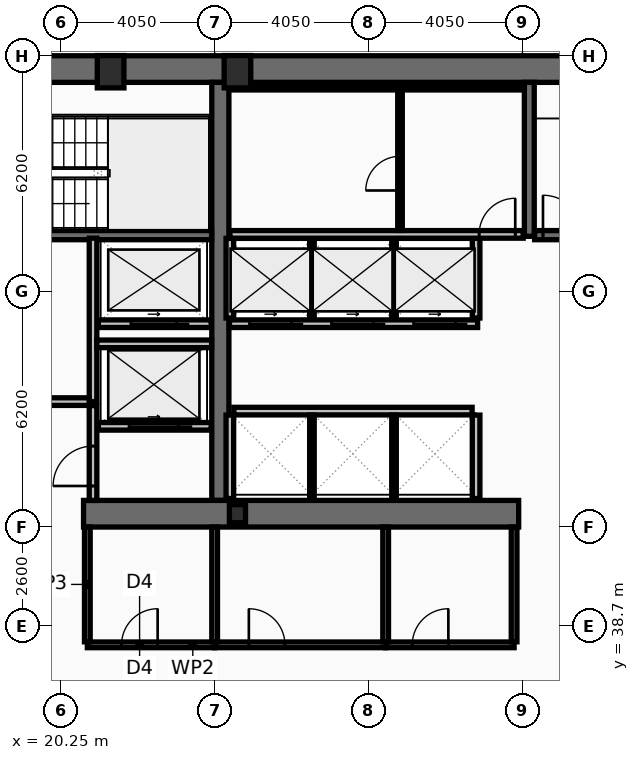
"""IFC4 building model, lengths in metres.
Left out: names, types, materials, properties, quantities, classifications, styles, units other than length and angle.
Written with IfcOpenShell. Run it as: python <this file> out.ifc"""

import sys

from ifc_helpers import new_model, si_unit, direction, frame, frame_2d, origin, origin_2d, place, context, subcontext, project, spatial, rectangle, hollow_rectangle, i_section, extrude, element, fill, save


model = new_model("IFC4")
c1 = context("Model", 3, precision=1e-05, world=origin(), true_north=direction((0.0, 1.0)))
c2 = subcontext(c1, "Body", "Model", "MODEL_VIEW")
j1 = project(units=[si_unit("LENGTHUNIT", "METRE"), si_unit("PLANEANGLEUNIT", "RADIAN")], contexts=[c1])
p1 = place(None, origin())
s1 = spatial("IfcSite", under=j1, at=p1, CompositionType="ELEMENT")
p2 = place(p1, origin())
s2 = spatial("IfcBuilding", under=s1, at=p2, CompositionType="ELEMENT")
p3 = place(p2, frame((0.0, 0.0, 98.6)))
s3 = spatial("IfcBuildingStorey", under=s2, at=p3, CompositionType="ELEMENT", Elevation=98.6)
p4 = place(p3, frame((16.2, 53.35, 0.0), z_axis=(0.0, 0.0, 1.0), x_axis=(1.0, 0.0, 0.0)))
e1 = element("IfcWall", 1, at=p4, inside=s3, PredefinedType="SHEAR", context=c2, shape_type="SweptSolid", body=[
    extrude(rectangle(XDim=40.5, YDim=0.7, at=frame_2d((20.25, 0.0))), origin(), (0.0, 0.0, 1.0), 3.82),
])
p5 = place(p3, frame((24.45, 42.0, 0.0), z_axis=(0.0, 0.0, 1.0), x_axis=(0.0, 1.0, 0.0)))
e2 = element("IfcWall", 2, at=p5, inside=s3, PredefinedType="SHEAR", context=c2, shape_type="SweptSolid", body=[
    extrude(rectangle(XDim=11.0, YDim=0.45, at=frame_2d((5.5, 0.0))), origin(), (0.0, 0.0, 1.0), 3.82),
])
p6 = place(p3, frame((32.3, 41.65, 0.0), z_axis=(0.0, 0.0, 1.0), x_axis=(-1.0, 0.0, 0.0)))
e3 = element("IfcWall", 3, at=p6, inside=s3, PredefinedType="SHEAR", context=c2, shape_type="SweptSolid", body=[
    extrude(rectangle(XDim=11.45, YDim=0.7, at=frame_2d((5.725, 0.0))), origin(), (0.0, 0.0, 1.0), 3.82),
])
p7 = place(p3, frame((32.58, 48.95, 0.0), z_axis=(0.0, 0.0, 1.0), x_axis=(0.0, 1.0, 0.0)))
e4 = element("IfcWall", 4, at=p7, inside=s3, PredefinedType="SHEAR", context=c2, shape_type="SweptSolid", body=[
    extrude(rectangle(XDim=4.05, YDim=0.26, at=frame_2d((2.025, 0.0))), origin(), (0.0, 0.0, 1.0), 3.82),
])
p8 = place(p3, frame((16.9, 48.98, 0.0), z_axis=(0.0, 0.0, 1.0), x_axis=(1.0, 0.0, 0.0)))
e5 = element("IfcWall", 5, at=p8, inside=s3, PredefinedType="SHEAR", context=c2, shape_type="SweptSolid", body=[
    extrude(rectangle(XDim=7.32, YDim=0.24, at=frame_2d((3.66, 0.0))), origin(), (0.0, 0.0, 1.0), 3.82),
])
p9 = place(p8, frame((0.22, 0.0, 0.0)))
e6 = element("IfcOpeningElement", 6, at=p9, cuts=e5, PredefinedType="OPENING", context=c2, shape_type="SweptSolid", body=[
    extrude(rectangle(XDim=1.05, YDim=2.15, at=frame_2d((0.525, 1.075))), frame((0.0, 0.13, 0.0), z_axis=(0.0, -1.0, 0.0), x_axis=(1.0, 0.0, 0.0)), (0.0, 0.0, 1.0), 0.26),
])
p10 = place(p3, frame((32.72, 48.98, 0.0), z_axis=(0.0, 0.0, 1.0), x_axis=(1.0, 0.0, 0.0)))
e7 = element("IfcWall", 7, at=p10, inside=s3, PredefinedType="SHEAR", context=c2, shape_type="SweptSolid", body=[
    extrude(rectangle(XDim=7.56, YDim=0.24, at=frame_2d((3.78, 0.0))), origin(), (0.0, 0.0, 1.0), 3.82),
])
p11 = place(p10, frame((0.22, 0.0, 0.0)))
e8 = element("IfcOpeningElement", 8, at=p11, cuts=e7, PredefinedType="OPENING", context=c2, shape_type="SweptSolid", body=[
    extrude(rectangle(XDim=1.05, YDim=2.15, at=frame_2d((0.525, 1.075))), frame((0.0, 0.13, 0.0), z_axis=(0.0, -1.0, 0.0), x_axis=(1.0, 0.0, 0.0)), (0.0, 0.0, 1.0), 0.26),
])
for number, where, z_axis, x_axis in (
    (9, (21.562, 53.28, 0.0), (0.0, 0.0, 1.0), (1.0, 0.0, 0.0)),
    (10, (24.9, 53.28, 0.0), (0.0, 0.0, 1.0), (1.0, 0.0, 0.0)),
):
    element("IfcColumn", number, at=place(p3, frame(where, z_axis=z_axis, x_axis=x_axis)), inside=s3, PredefinedType="COLUMN", context=c2, shape_type="SweptSolid", body=[
        extrude(hollow_rectangle(XDim=0.7, YDim=0.85, WallThickness=0.05, at=origin_2d()), origin(), (0.0, 0.0, 1.0), 4.0),
    ])
p12 = place(p3, frame((24.9, 41.65, 0.0), z_axis=(0.0, 0.0, 1.0), x_axis=(1.0, 0.0, 0.0)))
e11 = element("IfcColumn", 11, at=p12, inside=s3, PredefinedType="COLUMN", context=c2, shape_type="SweptSolid", body=[
    extrude(i_section(OverallWidth=0.424, OverallDepth=0.474, WebThickness=0.048, FlangeThickness=0.077, at=origin_2d()), origin(), (0.0, 0.0, 1.0), 4.0),
])
p13 = place(p3, frame((24.21, 43.95, 0.0), z_axis=(0.0, 0.0, 1.0), x_axis=(-1.0, 0.0, 0.0)))
e12 = element("IfcWall", 12, at=p13, inside=s3, PredefinedType="PARTITIONING", context=c2, shape_type="SweptSolid", body=[
    extrude(rectangle(XDim=2.97, YDim=0.2, at=frame_2d((1.485, 0.0))), origin(), (0.0, 0.0, 1.0), 3.82),
])
p14 = place(p13, frame((0.86, 0.0, 0.0)))
e13 = element("IfcOpeningElement", 13, at=p14, cuts=e12, PredefinedType="OPENING", context=c2, shape_type="SweptSolid", body=[
    extrude(rectangle(XDim=1.3, YDim=2.18, at=frame_2d((0.65, 1.09))), frame((0.0, 0.11, 0.0), z_axis=(0.0, -1.0, 0.0), x_axis=(1.0, 0.0, 0.0)), (0.0, 0.0, 1.0), 0.22),
])
p15 = place(p3, frame((24.21, 46.65, 0.0), z_axis=(0.0, 0.0, 1.0), x_axis=(-1.0, 0.0, 0.0)))
e14 = element("IfcWall", 14, at=p15, inside=s3, PredefinedType="PARTITIONING", context=c2, shape_type="SweptSolid", body=[
    extrude(rectangle(XDim=2.97, YDim=0.2, at=frame_2d((1.485, 0.0))), origin(), (0.0, 0.0, 1.0), 3.82),
])
p16 = place(p15, frame((0.91, 0.0, 0.0)))
e15 = element("IfcOpeningElement", 15, at=p16, cuts=e14, PredefinedType="OPENING", context=c2, shape_type="SweptSolid", body=[
    extrude(rectangle(XDim=1.2, YDim=2.18, at=frame_2d((0.6, 1.09))), frame((0.0, 0.11, 0.0), z_axis=(0.0, -1.0, 0.0), x_axis=(1.0, 0.0, 0.0)), (0.0, 0.0, 1.0), 0.22),
])
p17 = place(p3, frame((31.22, 46.65, 0.0), z_axis=(0.0, 0.0, 1.0), x_axis=(-1.0, 0.0, 0.0)))
e16 = element("IfcWall", 16, at=p17, inside=s3, PredefinedType="PARTITIONING", context=c2, shape_type="SweptSolid", body=[
    extrude(rectangle(XDim=6.53, YDim=0.2, at=frame_2d((3.265, 0.0))), origin(), (0.0, 0.0, 1.0), 3.82),
])
p18 = place(p17, frame((4.9, 0.0, 0.0)))
e17 = element("IfcOpeningElement", 17, at=p18, cuts=e16, PredefinedType="OPENING", context=c2, shape_type="SweptSolid", body=[
    extrude(rectangle(XDim=1.1, YDim=2.18, at=frame_2d((0.55, 1.09))), frame((0.0, 0.11, 0.0), z_axis=(0.0, -1.0, 0.0), x_axis=(1.0, 0.0, 0.0)), (0.0, 0.0, 1.0), 0.22),
])
p19 = place(p17, frame((2.74, 0.0, 0.0)))
e18 = element("IfcOpeningElement", 18, at=p19, cuts=e16, PredefinedType="OPENING", context=c2, shape_type="SweptSolid", body=[
    extrude(rectangle(XDim=1.1, YDim=2.18, at=frame_2d((0.55, 1.09))), frame((0.0, 0.11, 0.0), z_axis=(0.0, -1.0, 0.0), x_axis=(1.0, 0.0, 0.0)), (0.0, 0.0, 1.0), 0.22),
])
p20 = place(p17, frame((0.58, 0.0, 0.0)))
e19 = element("IfcOpeningElement", 19, at=p20, cuts=e16, PredefinedType="OPENING", context=c2, shape_type="SweptSolid", body=[
    extrude(rectangle(XDim=1.1, YDim=2.18, at=frame_2d((0.55, 1.09))), frame((0.0, 0.11, 0.0), z_axis=(0.0, -1.0, 0.0), x_axis=(1.0, 0.0, 0.0)), (0.0, 0.0, 1.0), 0.22),
])
p21 = place(p3, frame((21.1, 44.6, 0.0), z_axis=(0.0, 0.0, 1.0), x_axis=(0.0, 1.0, 0.0)))
e20 = element("IfcWall", 20, at=p21, inside=s3, PredefinedType="PARTITIONING", context=c2, shape_type="SweptSolid", body=[
    extrude(rectangle(XDim=4.3, YDim=0.2, at=frame_2d((2.15, 0.0))), origin(), (0.0, 0.0, 1.0), 3.82),
])
p22 = place(p3, frame((16.9, 44.6, 0.0), z_axis=(0.0, 0.0, 1.0), x_axis=(1.0, 0.0, 0.0)))
e21 = element("IfcWall", 21, at=p22, inside=s3, PredefinedType="PARTITIONING", context=c2, shape_type="SweptSolid", body=[
    extrude(rectangle(XDim=4.1, YDim=0.2, at=frame_2d((2.05, 0.0))), origin(), (0.0, 0.0, 1.0), 3.82),
])
p23 = place(p22, frame((1.25, 0.0, 0.0)))
e22 = element("IfcOpeningElement", 22, at=p23, cuts=e21, PredefinedType="OPENING", context=c2, shape_type="SweptSolid", body=[
    extrude(rectangle(XDim=1.05, YDim=2.15, at=frame_2d((0.525, 1.075))), frame((0.0, 0.11, 0.0), z_axis=(0.0, -1.0, 0.0), x_axis=(1.0, 0.0, 0.0)), (0.0, 0.0, 1.0), 0.22),
])
p24 = place(p3, frame((21.2, 46.12, 0.0), z_axis=(0.0, 0.0, 1.0), x_axis=(1.0, 0.0, 0.0)))
e23 = element("IfcWall", 23, at=p24, inside=s3, PredefinedType="PARTITIONING", context=c2, shape_type="SweptSolid", body=[
    extrude(rectangle(XDim=3.02, YDim=0.2, at=frame_2d((1.51, 0.0))), origin(), (0.0, 0.0, 1.0), 3.82),
])
p25 = place(p3, frame((21.1, 42.0, 0.0), z_axis=(0.0, 0.0, 1.0), x_axis=(0.0, 1.0, 0.0)))
e24 = element("IfcWall", 24, at=p25, inside=s3, PredefinedType="PARTITIONING", context=c2, shape_type="SweptSolid", body=[
    extrude(rectangle(XDim=2.495, YDim=0.2, at=frame_2d((1.248, 0.0))), origin(), (0.0, 0.0, 1.0), 3.82),
])
p26 = place(p25, frame((0.38, 0.0, 0.0)))
e25 = element("IfcOpeningElement", 25, at=p26, cuts=e24, PredefinedType="OPENING", context=c2, shape_type="SweptSolid", body=[
    extrude(rectangle(XDim=1.05, YDim=2.15, at=frame_2d((0.525, 1.075))), frame((0.0, 0.11, 0.0), z_axis=(0.0, -1.0, 0.0), x_axis=(1.0, 0.0, 0.0)), (0.0, 0.0, 1.0), 0.22),
])
for number, where, z_axis, x_axis in (
    (26, (24.7, 46.8, 0.0), (0.0, 0.0, 1.0), (0.0, 1.0, 0.0)),
    (27, (31.18, 46.8, 0.0), (0.0, 0.0, 1.0), (0.0, 1.0, 0.0)),
):
    element("IfcWall", number, at=place(p3, frame(where, z_axis=z_axis, x_axis=x_axis)), inside=s3, PredefinedType="PARTITIONING", context=c2, shape_type="SweptSolid", body=[
        extrude(rectangle(XDim=2.095, YDim=0.2, at=frame_2d((1.047, 0.0))), origin(), (0.0, 0.0, 1.0), 3.82),
    ])
for number, where, z_axis, x_axis in (
    (28, (26.86, 46.8, 0.0), (0.0, 0.0, 1.0), (0.0, 1.0, 0.0)),
    (29, (29.02, 46.8, 0.0), (0.0, 0.0, 1.0), (0.0, 1.0, 0.0)),
):
    element("IfcWall", number, at=place(p3, frame(where, z_axis=z_axis, x_axis=x_axis)), inside=s3, PredefinedType="PARTITIONING", context=c2, shape_type="SweptSolid", body=[
        extrude(rectangle(XDim=2.095, YDim=0.12, at=frame_2d((1.047, 0.0))), origin(), (0.0, 0.0, 1.0), 3.82),
    ])
p27 = place(p3, frame((24.805, 44.35, 0.0), z_axis=(0.0, 0.0, 1.0), x_axis=(1.0, 0.0, 0.0)))
e30 = element("IfcWall", 30, at=p27, inside=s3, PredefinedType="PARTITIONING", context=c2, shape_type="SweptSolid", body=[
    extrude(rectangle(XDim=6.27, YDim=0.2, at=frame_2d((3.135, 0.0))), origin(), (0.0, 0.0, 1.0), 3.82),
])
for number, where, z_axis, x_axis in (
    (31, (24.7, 42.05, 0.0), (0.0, 0.0, 1.0), (0.0, 1.0, 0.0)),
    (32, (31.18, 42.05, 0.0), (0.0, 0.0, 1.0), (0.0, 1.0, 0.0)),
):
    element("IfcWall", number, at=place(p3, frame(where, z_axis=z_axis, x_axis=x_axis)), inside=s3, PredefinedType="PARTITIONING", context=c2, shape_type="SweptSolid", body=[
        extrude(rectangle(XDim=2.195, YDim=0.2, at=frame_2d((1.098, 0.0))), origin(), (0.0, 0.0, 1.0), 3.82),
    ])
for number, where, z_axis, x_axis in (
    (33, (26.86, 42.05, 0.0), (0.0, 0.0, 1.0), (0.0, 1.0, 0.0)),
    (34, (29.02, 42.05, 0.0), (0.0, 0.0, 1.0), (0.0, 1.0, 0.0)),
):
    element("IfcWall", number, at=place(p3, frame(where, z_axis=z_axis, x_axis=x_axis)), inside=s3, PredefinedType="PARTITIONING", context=c2, shape_type="SweptSolid", body=[
        extrude(rectangle(XDim=2.195, YDim=0.12, at=frame_2d((1.098, 0.0))), origin(), (0.0, 0.0, 1.0), 3.82),
    ])
p28 = place(p3, frame((24.7, 52.86, 0.0), z_axis=(0.0, 0.0, 1.0), x_axis=(1.0, 0.0, 0.0)))
e35 = element("IfcWall", 35, at=p28, inside=s3, PredefinedType="PARTITIONING", context=c2, shape_type="SweptSolid", body=[
    extrude(rectangle(XDim=7.72, YDim=0.12, at=frame_2d((3.86, 0.0))), origin(), (0.0, 0.0, 1.0), 3.82),
])
p29 = place(p3, frame((24.7, 49.0, 0.0), z_axis=(0.0, 0.0, 1.0), x_axis=(1.0, 0.0, 0.0)))
e36 = element("IfcWall", 36, at=p29, inside=s3, PredefinedType="PARTITIONING", context=c2, shape_type="SweptSolid", body=[
    extrude(rectangle(XDim=7.72, YDim=0.2, at=frame_2d((3.86, 0.0))), origin(), (0.0, 0.0, 1.0), 3.82),
])
p30 = place(p29, frame((6.56, 0.0, 0.0)))
e37 = element("IfcOpeningElement", 37, at=p30, cuts=e36, PredefinedType="OPENING", context=c2, shape_type="SweptSolid", body=[
    extrude(rectangle(XDim=0.95, YDim=2.1, at=frame_2d((0.475, 1.05))), frame((0.0, 0.11, 0.0), z_axis=(0.0, -1.0, 0.0), x_axis=(1.0, 0.0, 0.0)), (0.0, 0.0, 1.0), 0.22),
])
p31 = place(p3, frame((29.177, 49.105, 0.0), z_axis=(0.0, 0.0, 1.0), x_axis=(0.0, 1.0, 0.0)))
e38 = element("IfcWall", 38, at=p31, inside=s3, PredefinedType="PARTITIONING", context=c2, shape_type="SweptSolid", body=[
    extrude(rectangle(XDim=3.69, YDim=0.12, at=frame_2d((1.845, 0.0))), origin(), (0.0, 0.0, 1.0), 3.82),
])
p32 = place(p31, frame((1.05, 0.0, 0.0)))
e39 = element("IfcOpeningElement", 39, at=p32, cuts=e38, PredefinedType="OPENING", context=c2, shape_type="SweptSolid", body=[
    extrude(rectangle(XDim=0.9, YDim=2.05, at=frame_2d((0.45, 1.025))), frame((0.0, 0.07, 0.0), z_axis=(0.0, -1.0, 0.0), x_axis=(1.0, 0.0, 0.0)), (0.0, 0.0, 1.0), 0.14),
])
p33 = place(p3, frame((20.95, 38.2, 0.0), z_axis=(0.0, 0.0, 1.0), x_axis=(1.0, 0.0, 0.0)))
e40 = element("IfcWall", 40, at=p33, inside=s3, PredefinedType="PARTITIONING", context=c2, shape_type="SweptSolid", body=[
    extrude(rectangle(XDim=3.35, YDim=0.15, at=frame_2d((1.675, 0.0))), origin(), (0.0, 0.0, 1.0), 3.82),
])
p34 = place(p33, frame((0.9, 0.0, 0.0)))
e41 = element("IfcOpeningElement", 41, at=p34, cuts=e40, PredefinedType="OPENING", context=c2, shape_type="SweptSolid", body=[
    extrude(rectangle(XDim=0.95, YDim=2.05, at=frame_2d((0.475, 1.025))), frame((0.0, 0.085, 0.0), z_axis=(0.0, -1.0, 0.0), x_axis=(1.0, 0.0, 0.0)), (0.0, 0.0, 1.0), 0.17),
])
p35 = place(p3, frame((24.3, 38.2, 0.0), z_axis=(0.0, 0.0, 1.0), x_axis=(1.0, 0.0, 0.0)))
e42 = element("IfcWall", 42, at=p35, inside=s3, PredefinedType="PARTITIONING", context=c2, shape_type="SweptSolid", body=[
    extrude(rectangle(XDim=4.5, YDim=0.15, at=frame_2d((2.25, 0.0))), origin(), (0.0, 0.0, 1.0), 3.01),
])
p36 = place(p35, frame((0.9, 0.0, 0.0)))
e43 = element("IfcOpeningElement", 43, at=p36, cuts=e42, PredefinedType="OPENING", context=c2, shape_type="SweptSolid", body=[
    extrude(rectangle(XDim=0.95, YDim=2.05, at=frame_2d((0.475, 1.025))), frame((0.0, 0.085, 0.0), z_axis=(0.0, -1.0, 0.0), x_axis=(1.0, 0.0, 0.0)), (0.0, 0.0, 1.0), 0.17),
])
p37 = place(p3, frame((28.8, 38.2, 0.0), z_axis=(0.0, 0.0, 1.0), x_axis=(1.0, 0.0, 0.0)))
e44 = element("IfcWall", 44, at=p37, inside=s3, PredefinedType="PARTITIONING", context=c2, shape_type="SweptSolid", body=[
    extrude(rectangle(XDim=3.38, YDim=0.15, at=frame_2d((1.69, 0.0))), origin(), (0.0, 0.0, 1.0), 3.01),
])
p38 = place(p37, frame((0.7, 0.0, 0.0)))
e45 = element("IfcOpeningElement", 45, at=p38, cuts=e44, PredefinedType="OPENING", context=c2, shape_type="SweptSolid", body=[
    extrude(rectangle(XDim=0.95, YDim=2.05, at=frame_2d((0.475, 1.025))), frame((0.0, 0.085, 0.0), z_axis=(0.0, -1.0, 0.0), x_axis=(1.0, 0.0, 0.0)), (0.0, 0.0, 1.0), 0.17),
])
for number, where, z_axis, x_axis in (
    (46, (20.95, 38.28, 0.0), (0.0, 0.0, 1.0), (0.0, 1.0, 0.0)),
    (47, (24.3, 38.28, 0.0), (0.0, 0.0, 1.0), (0.0, 1.0, 0.0)),
    (48, (28.8, 38.28, 0.0), (0.0, 0.0, 1.0), (0.0, 1.0, 0.0)),
    (49, (32.18, 38.28, 0.0), (0.0, 0.0, 1.0), (0.0, 1.0, 0.0)),
):
    element("IfcWall", number, at=place(p3, frame(where, z_axis=z_axis, x_axis=x_axis)), inside=s3, PredefinedType="PARTITIONING", context=c2, shape_type="SweptSolid", body=[
        extrude(rectangle(XDim=3.02, YDim=0.15, at=frame_2d((1.51, 0.0))), origin(), (0.0, 0.0, 1.0), 3.82),
    ])
p39 = place(p11, origin())
e50 = element("IfcDoor", 50, at=p39, inside=s3, OperationType="SINGLE_SWING_LEFT", PredefinedType="DOOR", context=c2, shape_type="SweptSolid", body=[
    extrude(rectangle(XDim=1.05, YDim=2.15, at=frame_2d((0.525, 1.075))), frame((0.0, 0.025, 0.0), z_axis=(0.0, -1.0, 0.0), x_axis=(1.0, 0.0, 0.0)), (0.0, 0.0, 1.0), 0.05),
])
fill(e8, e50)
p40 = place(p14, origin())
e51 = element("IfcDoor", 51, at=p40, inside=s3, OperationType="SLIDING_TO_LEFT", PredefinedType="DOOR", context=c2, shape_type="SweptSolid", body=[
    extrude(rectangle(XDim=1.3, YDim=2.18, at=frame_2d((0.65, 1.09))), frame((0.0, 0.025, 0.0), z_axis=(0.0, -1.0, 0.0), x_axis=(1.0, 0.0, 0.0)), (0.0, 0.0, 1.0), 0.05),
])
fill(e13, e51)
p41 = place(p16, origin())
e52 = element("IfcDoor", 52, at=p41, inside=s3, OperationType="SLIDING_TO_LEFT", PredefinedType="DOOR", context=c2, shape_type="SweptSolid", body=[
    extrude(rectangle(XDim=1.2, YDim=2.18, at=frame_2d((0.6, 1.09))), frame((0.0, 0.025, 0.0), z_axis=(0.0, -1.0, 0.0), x_axis=(1.0, 0.0, 0.0)), (0.0, 0.0, 1.0), 0.05),
])
fill(e15, e52)
p42 = place(p18, origin())
e53 = element("IfcDoor", 53, at=p42, inside=s3, OperationType="SLIDING_TO_LEFT", PredefinedType="DOOR", context=c2, shape_type="SweptSolid", body=[
    extrude(rectangle(XDim=1.1, YDim=2.18, at=frame_2d((0.55, 1.09))), frame((0.0, 0.025, 0.0), z_axis=(0.0, -1.0, 0.0), x_axis=(1.0, 0.0, 0.0)), (0.0, 0.0, 1.0), 0.05),
])
fill(e17, e53)
p43 = place(p19, origin())
e54 = element("IfcDoor", 54, at=p43, inside=s3, OperationType="SLIDING_TO_LEFT", PredefinedType="DOOR", context=c2, shape_type="SweptSolid", body=[
    extrude(rectangle(XDim=1.1, YDim=2.18, at=frame_2d((0.55, 1.09))), frame((0.0, 0.025, 0.0), z_axis=(0.0, -1.0, 0.0), x_axis=(1.0, 0.0, 0.0)), (0.0, 0.0, 1.0), 0.05),
])
fill(e18, e54)
p44 = place(p20, origin())
e55 = element("IfcDoor", 55, at=p44, inside=s3, OperationType="SLIDING_TO_LEFT", PredefinedType="DOOR", context=c2, shape_type="SweptSolid", body=[
    extrude(rectangle(XDim=1.1, YDim=2.18, at=frame_2d((0.55, 1.09))), frame((0.0, 0.025, 0.0), z_axis=(0.0, -1.0, 0.0), x_axis=(1.0, 0.0, 0.0)), (0.0, 0.0, 1.0), 0.05),
])
fill(e19, e55)
p45 = place(p26, origin())
e56 = element("IfcDoor", 56, at=p45, inside=s3, OperationType="SINGLE_SWING_LEFT", PredefinedType="DOOR", context=c2, shape_type="SweptSolid", body=[
    extrude(rectangle(XDim=1.05, YDim=2.15, at=frame_2d((0.525, 1.075))), frame((0.0, 0.025, 0.0), z_axis=(0.0, -1.0, 0.0), x_axis=(1.0, 0.0, 0.0)), (0.0, 0.0, 1.0), 0.05),
])
fill(e25, e56)
p46 = place(p30, origin())
e57 = element("IfcDoor", 57, at=p46, inside=s3, OperationType="SINGLE_SWING_RIGHT", PredefinedType="DOOR", context=c2, shape_type="SweptSolid", body=[
    extrude(rectangle(XDim=0.95, YDim=2.1, at=frame_2d((0.475, 1.05))), frame((0.0, 0.025, 0.0), z_axis=(0.0, -1.0, 0.0), x_axis=(1.0, 0.0, 0.0)), (0.0, 0.0, 1.0), 0.05),
])
fill(e37, e57)
p47 = place(p32, origin())
e58 = element("IfcDoor", 58, at=p47, inside=s3, OperationType="SINGLE_SWING_LEFT", PredefinedType="DOOR", context=c2, shape_type="SweptSolid", body=[
    extrude(rectangle(XDim=0.9, YDim=2.05, at=frame_2d((0.45, 1.025))), frame((0.0, 0.025, 0.0), z_axis=(0.0, -1.0, 0.0), x_axis=(1.0, 0.0, 0.0)), (0.0, 0.0, 1.0), 0.05),
])
fill(e39, e58)
p48 = place(p34, origin())
e59 = element("IfcDoor", 59, at=p48, inside=s3, OperationType="SINGLE_SWING_RIGHT", PredefinedType="DOOR", context=c2, shape_type="SweptSolid", body=[
    extrude(rectangle(XDim=0.95, YDim=2.05, at=frame_2d((0.475, 1.025))), frame((0.0, 0.025, 0.0), z_axis=(0.0, -1.0, 0.0), x_axis=(1.0, 0.0, 0.0)), (0.0, 0.0, 1.0), 0.05),
])
fill(e41, e59)
p49 = place(p36, origin())
e60 = element("IfcDoor", 60, at=p49, inside=s3, OperationType="SINGLE_SWING_LEFT", PredefinedType="DOOR", context=c2, shape_type="SweptSolid", body=[
    extrude(rectangle(XDim=0.95, YDim=2.05, at=frame_2d((0.475, 1.025))), frame((0.0, 0.025, 0.0), z_axis=(0.0, -1.0, 0.0), x_axis=(1.0, 0.0, 0.0)), (0.0, 0.0, 1.0), 0.05),
])
fill(e43, e60)
p50 = place(p38, origin())
e61 = element("IfcDoor", 61, at=p50, inside=s3, OperationType="SINGLE_SWING_RIGHT", PredefinedType="DOOR", context=c2, shape_type="SweptSolid", body=[
    extrude(rectangle(XDim=0.95, YDim=2.05, at=frame_2d((0.475, 1.025))), frame((0.0, 0.025, 0.0), z_axis=(0.0, -1.0, 0.0), x_axis=(1.0, 0.0, 0.0)), (0.0, 0.0, 1.0), 0.05),
])
fill(e45, e61)
save(model, sys.argv[1])
